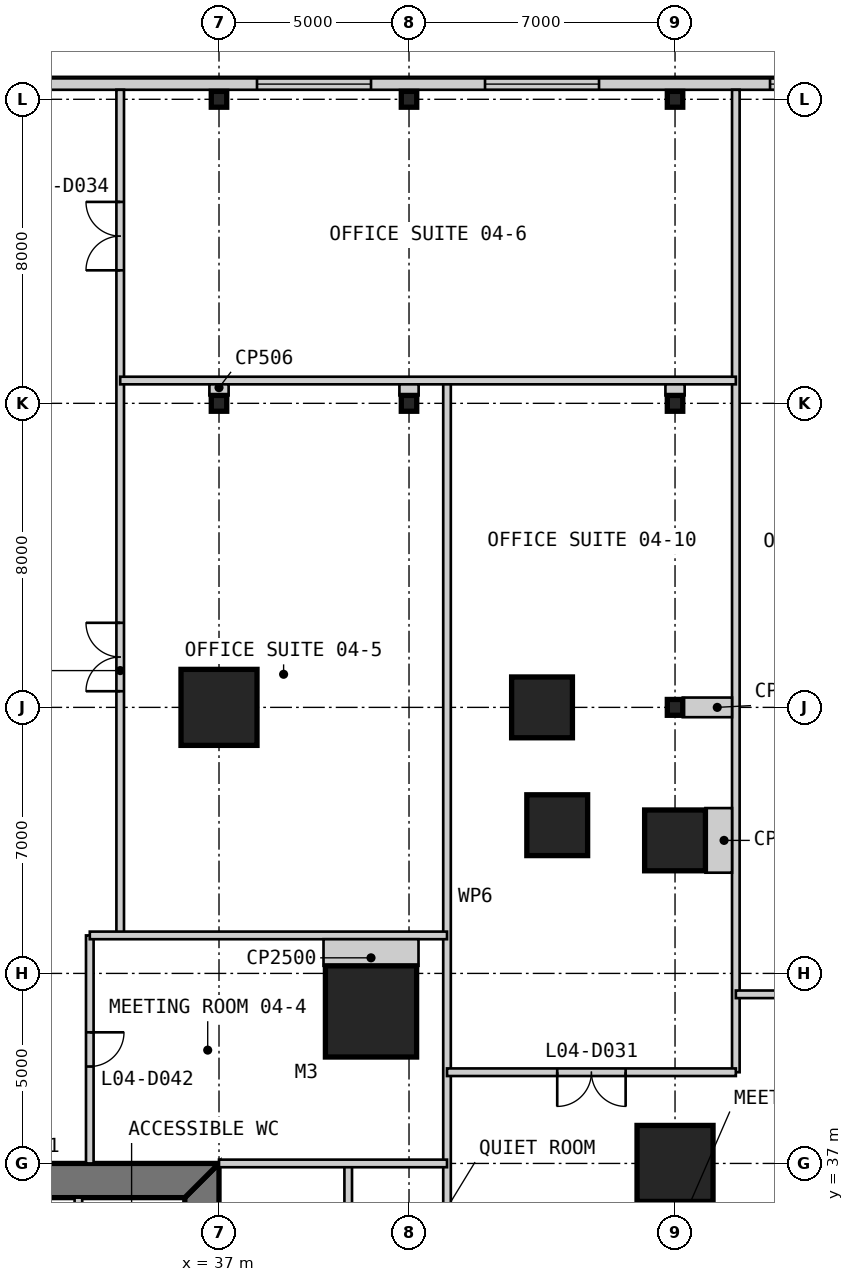
"""IFC4 building model, lengths in metres.
Left out: names, types, materials, properties, quantities, classifications, styles, units other than length and angle.
Written with IfcOpenShell. Run it as: python <this file> out.ifc"""

import sys

from ifc_helpers import new_model, si_unit, direction, frame, frame_2d, origin, origin_2d, place, context, subcontext, project, spatial, polyline, rectangle, i_section, outline, extrude, element, fill, save


model = new_model("IFC4")
c1 = context("Model", 3, precision=1e-05, world=origin(), true_north=direction((0.0, 1.0)))
c2 = subcontext(c1, "Body", "Model", "MODEL_VIEW")
j1 = project(units=[si_unit("LENGTHUNIT", "METRE"), si_unit("PLANEANGLEUNIT", "RADIAN")], contexts=[c1])
p1 = place(None, origin())
s1 = spatial("IfcSite", under=j1, at=p1, CompositionType="ELEMENT")
p2 = place(p1, origin())
s2 = spatial("IfcBuilding", under=s1, at=p2, CompositionType="ELEMENT")
p3 = place(p2, frame((0.0, 0.0, 21.4)))
s3 = spatial("IfcBuildingStorey", under=s2, at=p3, CompositionType="ELEMENT", Elevation=21.4)
p4 = place(p3, frame((41.0, 41.0, 0.0), z_axis=(0.0, 0.0, 1.0), x_axis=(1.0, 0.0, 0.0)))
e1 = element("IfcColumn", 1, at=p4, inside=s3, PredefinedType="COLUMN", context=c2, shape_type="SweptSolid", body=[
    extrude(rectangle(XDim=2.4, YDim=2.4, at=origin_2d()), origin(), (0.0, 0.0, 1.0), 4.8),
])
p5 = place(p3, frame((49.0, 37.0, 0.0), z_axis=(0.0, 0.0, 1.0), x_axis=(1.0, 0.0, 0.0)))
e2 = element("IfcColumn", 2, at=p5, inside=s3, PredefinedType="COLUMN", context=c2, shape_type="SweptSolid", body=[
    extrude(rectangle(XDim=2.0, YDim=2.0, at=origin_2d()), origin(), (0.0, 0.0, 1.0), 4.8),
])
for number, where, z_axis, x_axis in (
    (3, (49.0, 45.5, 0.0), (0.0, 0.0, 1.0), (1.0, 0.0, 0.0)),
    (4, (45.9, 45.9, 0.0), (0.0, 0.0, 1.0), (1.0, 0.0, 0.0)),
    (5, (45.5, 49.0, 0.0), (0.0, 0.0, 1.0), (1.0, 0.0, 0.0)),
):
    element("IfcColumn", number, at=place(p3, frame(where, z_axis=z_axis, x_axis=x_axis)), inside=s3, PredefinedType="COLUMN", context=c2, shape_type="SweptSolid", body=[
        extrude(rectangle(XDim=1.6, YDim=1.6, at=origin_2d()), origin(), (0.0, 0.0, 1.0), 4.8),
    ])
p6 = place(p3, frame((37.0, 49.0, 0.0), z_axis=(0.0, 0.0, 1.0), x_axis=(1.0, 0.0, 0.0)))
e6 = element("IfcColumn", 6, at=p6, inside=s3, PredefinedType="COLUMN", context=c2, shape_type="SweptSolid", body=[
    extrude(rectangle(XDim=2.0, YDim=2.0, at=origin_2d()), origin(), (0.0, 0.0, 1.0), 4.8),
])
for number, where, z_axis, x_axis in (
    (7, (37.0, 57.0, 0.0), (0.0, 0.0, 1.0), (1.0, 0.0, 0.0)),
    (8, (37.0, 65.0, 0.0), (0.0, 0.0, 1.0), (1.0, 0.0, 0.0)),
    (9, (42.0, 57.0, 0.0), (0.0, 0.0, 1.0), (1.0, 0.0, 0.0)),
    (10, (42.0, 65.0, 0.0), (0.0, 0.0, 1.0), (1.0, 0.0, 0.0)),
    (11, (49.0, 49.0, 0.0), (0.0, 0.0, 1.0), (1.0, 0.0, 0.0)),
    (12, (49.0, 57.0, 0.0), (0.0, 0.0, 1.0), (1.0, 0.0, 0.0)),
    (13, (49.0, 65.0, 0.0), (0.0, 0.0, 1.0), (1.0, 0.0, 0.0)),
):
    element("IfcColumn", number, at=place(p3, frame(where, z_axis=z_axis, x_axis=x_axis)), inside=s3, PredefinedType="COLUMN", context=c2, shape_type="SweptSolid", body=[
        extrude(i_section(OverallWidth=0.406, OverallDepth=0.417, WebThickness=0.03, FlangeThickness=0.048, at=origin_2d()), origin(), (0.0, 0.0, 1.0), 4.8),
    ])
p7 = place(p3, frame((36.55, 13.9, 0.0), z_axis=(0.0, 0.0, 1.0), x_axis=(0.0, 1.0, 0.0)))
e14 = element("IfcWall", 14, at=p7, inside=s3, PredefinedType="SHEAR", context=c2, shape_type="SweptSolid", body=[
    extrude(outline(polyline([(-0.9, -0.45), (23.1, -0.45), (22.2, 0.45), (0.0, 0.45), (-0.9, -0.45)])), origin(), (0.0, 0.0, 1.0), 4.8),
])
p8 = place(p7, frame((20.2, 0.0, 0.0)))
e15 = element("IfcOpeningElement", 15, at=p8, cuts=e14, PredefinedType="OPENING", context=c2, shape_type="SweptSolid", body=[
    extrude(rectangle(XDim=1.0, YDim=2.2, at=frame_2d((0.5, 1.1))), frame((0.0, 0.46, 0.0), z_axis=(0.0, -1.0, 0.0), x_axis=(1.0, 0.0, 0.0)), (0.0, 0.0, 1.0), 0.92),
])
p9 = place(p7, frame((17.25, 0.0, 0.0)))
e16 = element("IfcOpeningElement", 16, at=p9, cuts=e14, PredefinedType="OPENING", context=c2, shape_type="SweptSolid", body=[
    extrude(rectangle(XDim=0.9, YDim=2.2, at=frame_2d((0.45, 1.1))), frame((0.0, 0.46, 0.0), z_axis=(0.0, -1.0, 0.0), x_axis=(1.0, 0.0, 0.0)), (0.0, 0.0, 1.0), 0.92),
])
p10 = place(p3, frame((37.0, 36.55, 0.0), z_axis=(0.0, 0.0, 1.0), x_axis=(-1.0, 0.0, 0.0)))
e17 = element("IfcWall", 17, at=p10, inside=s3, PredefinedType="SHEAR", context=c2, shape_type="SweptSolid", body=[
    extrude(outline(polyline([(0.0, -0.45), (24.0, -0.45), (23.1, 0.45), (0.9, 0.45), (0.0, -0.45)])), origin(), (0.0, 0.0, 1.0), 4.8),
])
p11 = place(p10, frame((4.9, 0.0, 0.0)))
e18 = element("IfcOpeningElement", 18, at=p11, cuts=e17, PredefinedType="OPENING", context=c2, shape_type="SweptSolid", body=[
    extrude(rectangle(XDim=1.0, YDim=2.2, at=frame_2d((0.5, 1.1))), frame((0.0, 0.46, 0.0), z_axis=(0.0, -1.0, 0.0), x_axis=(1.0, 0.0, 0.0)), (0.0, 0.0, 1.0), 0.92),
])
p12 = place(p10, frame((8.9, 0.0, 0.0)))
e19 = element("IfcOpeningElement", 19, at=p12, cuts=e17, PredefinedType="OPENING", context=c2, shape_type="SweptSolid", body=[
    extrude(rectangle(XDim=1.1, YDim=2.2, at=frame_2d((0.55, 1.1))), frame((0.0, 0.46, 0.0), z_axis=(0.0, -1.0, 0.0), x_axis=(1.0, 0.0, 0.0)), (0.0, 0.0, 1.0), 0.92),
])
p13 = place(p10, frame((15.05, 0.0, 0.0)))
e20 = element("IfcOpeningElement", 20, at=p13, cuts=e17, PredefinedType="OPENING", context=c2, shape_type="SweptSolid", body=[
    extrude(rectangle(XDim=0.9, YDim=2.2, at=frame_2d((0.45, 1.1))), frame((0.0, 0.46, 0.0), z_axis=(0.0, -1.0, 0.0), x_axis=(1.0, 0.0, 0.0)), (0.0, 0.0, 1.0), 0.92),
])
p14 = place(p10, frame((17.9, 0.0, 0.0)))
e21 = element("IfcOpeningElement", 21, at=p14, cuts=e17, PredefinedType="OPENING", context=c2, shape_type="SweptSolid", body=[
    extrude(rectangle(XDim=1.0, YDim=2.2, at=frame_2d((0.5, 1.1))), frame((0.0, 0.46, 0.0), z_axis=(0.0, -1.0, 0.0), x_axis=(1.0, 0.0, 0.0)), (0.0, 0.0, 1.0), 0.92),
])
p15 = place(p10, frame((21.4, 0.0, 0.0)))
e22 = element("IfcOpeningElement", 22, at=p15, cuts=e17, PredefinedType="OPENING", context=c2, shape_type="SweptSolid", body=[
    extrude(rectangle(XDim=1.0, YDim=2.2, at=frame_2d((0.5, 1.1))), frame((0.0, 0.46, 0.0), z_axis=(0.0, -1.0, 0.0), x_axis=(1.0, 0.0, 0.0)), (0.0, 0.0, 1.0), 0.92),
])
p16 = place(p3, frame((57.55, 65.4, 0.0), z_axis=(0.0, 0.0, 1.0), x_axis=(-1.0, 0.0, 0.0)))
e23 = element("IfcWall", 23, at=p16, inside=s3, PredefinedType="SOLIDWALL", context=c2, shape_type="SweptSolid", body=[
    extrude(rectangle(XDim=65.1, YDim=0.3, at=frame_2d((32.55, 0.0))), origin(), (0.0, 0.0, 1.0), 4.5),
])
p17 = place(p16, frame((59.05, 0.0, 0.9)))
e24 = element("IfcOpeningElement", 24, at=p17, cuts=e23, PredefinedType="OPENING", context=c2, shape_type="SweptSolid", body=[
    extrude(rectangle(XDim=3.0, YDim=2.4, at=frame_2d((1.5, 1.2))), frame((0.0, 0.16, 0.0), z_axis=(0.0, -1.0, 0.0), x_axis=(1.0, 0.0, 0.0)), (0.0, 0.0, 1.0), 0.32),
])
p18 = place(p16, frame((51.05, 0.0, 0.9)))
e25 = element("IfcOpeningElement", 25, at=p18, cuts=e23, PredefinedType="OPENING", context=c2, shape_type="SweptSolid", body=[
    extrude(rectangle(XDim=3.0, YDim=2.4, at=frame_2d((1.5, 1.2))), frame((0.0, 0.16, 0.0), z_axis=(0.0, -1.0, 0.0), x_axis=(1.0, 0.0, 0.0)), (0.0, 0.0, 1.0), 0.32),
])
p19 = place(p16, frame((37.05, 0.0, 0.9)))
e26 = element("IfcOpeningElement", 26, at=p19, cuts=e23, PredefinedType="OPENING", context=c2, shape_type="SweptSolid", body=[
    extrude(rectangle(XDim=3.0, YDim=2.4, at=frame_2d((1.5, 1.2))), frame((0.0, 0.16, 0.0), z_axis=(0.0, -1.0, 0.0), x_axis=(1.0, 0.0, 0.0)), (0.0, 0.0, 1.0), 0.32),
])
p20 = place(p16, frame((25.05, 0.0, 0.9)))
e27 = element("IfcOpeningElement", 27, at=p20, cuts=e23, PredefinedType="OPENING", context=c2, shape_type="SweptSolid", body=[
    extrude(rectangle(XDim=3.0, YDim=2.4, at=frame_2d((1.5, 1.2))), frame((0.0, 0.16, 0.0), z_axis=(0.0, -1.0, 0.0), x_axis=(1.0, 0.0, 0.0)), (0.0, 0.0, 1.0), 0.32),
])
p21 = place(p16, frame((16.55, 0.0, 0.9)))
e28 = element("IfcOpeningElement", 28, at=p21, cuts=e23, PredefinedType="OPENING", context=c2, shape_type="SweptSolid", body=[
    extrude(rectangle(XDim=3.0, YDim=2.4, at=frame_2d((1.5, 1.2))), frame((0.0, 0.16, 0.0), z_axis=(0.0, -1.0, 0.0), x_axis=(1.0, 0.0, 0.0)), (0.0, 0.0, 1.0), 0.32),
])
p22 = place(p16, frame((10.55, 0.0, 0.9)))
e29 = element("IfcOpeningElement", 29, at=p22, cuts=e23, PredefinedType="OPENING", context=c2, shape_type="SweptSolid", body=[
    extrude(rectangle(XDim=3.0, YDim=2.4, at=frame_2d((1.5, 1.2))), frame((0.0, 0.16, 0.0), z_axis=(0.0, -1.0, 0.0), x_axis=(1.0, 0.0, 0.0)), (0.0, 0.0, 1.0), 0.32),
])
p23 = place(p16, frame((3.05, 0.0, 0.9)))
e30 = element("IfcOpeningElement", 30, at=p23, cuts=e23, PredefinedType="OPENING", context=c2, shape_type="SweptSolid", body=[
    extrude(rectangle(XDim=3.0, YDim=2.4, at=frame_2d((1.5, 1.2))), frame((0.0, 0.16, 0.0), z_axis=(0.0, -1.0, 0.0), x_axis=(1.0, 0.0, 0.0)), (0.0, 0.0, 1.0), 0.32),
])
p24 = place(p3, frame((33.3, 36.1, 0.0), z_axis=(0.0, 0.0, 1.0), x_axis=(0.0, -1.0, 0.0)))
e31 = element("IfcWall", 31, at=p24, inside=s3, PredefinedType="PARTITIONING", context=c2, shape_type="SweptSolid", body=[
    extrude(rectangle(XDim=16.1, YDim=0.2, at=frame_2d((8.05, 0.0))), origin(), (0.0, 0.0, 1.0), 4.6),
])
p25 = place(p3, frame((33.6, 37.0, 0.0), z_axis=(0.0, 0.0, 1.0), x_axis=(0.0, 1.0, 0.0)))
e32 = element("IfcWall", 32, at=p25, inside=s3, PredefinedType="PARTITIONING", context=c2, shape_type="SweptSolid", body=[
    extrude(rectangle(XDim=6.0, YDim=0.2, at=frame_2d((3.0, 0.0))), origin(), (0.0, 0.0, 1.0), 4.5),
])
p26 = place(p25, frame((2.55, 0.0, 0.0)))
e33 = element("IfcOpeningElement", 33, at=p26, cuts=e32, PredefinedType="OPENING", context=c2, shape_type="SweptSolid", body=[
    extrude(rectangle(XDim=0.9, YDim=2.2, at=frame_2d((0.45, 1.1))), frame((0.0, 0.11, 0.0), z_axis=(0.0, -1.0, 0.0), x_axis=(1.0, 0.0, 0.0)), (0.0, 0.0, 1.0), 0.22),
])
p27 = place(p3, frame((34.4, 43.0, 0.0), z_axis=(0.0, 0.0, 1.0), x_axis=(0.0, 1.0, 0.0)))
e34 = element("IfcWall", 34, at=p27, inside=s3, PredefinedType="PARTITIONING", context=c2, shape_type="SweptSolid", body=[
    extrude(rectangle(XDim=22.25, YDim=0.2, at=frame_2d((11.125, 0.0))), origin(), (0.0, 0.0, 1.0), 4.5),
])
p28 = place(p27, frame((6.425, 0.0, 0.0)))
e35 = element("IfcOpeningElement", 35, at=p28, cuts=e34, PredefinedType="OPENING", context=c2, shape_type="SweptSolid", body=[
    extrude(rectangle(XDim=1.8, YDim=2.4, at=frame_2d((0.9, 1.2))), frame((0.0, 0.11, 0.0), z_axis=(0.0, -1.0, 0.0), x_axis=(1.0, 0.0, 0.0)), (0.0, 0.0, 1.0), 0.22),
])
p29 = place(p27, frame((17.5, 0.0, 0.0)))
e36 = element("IfcOpeningElement", 36, at=p29, cuts=e34, PredefinedType="OPENING", context=c2, shape_type="SweptSolid", body=[
    extrude(rectangle(XDim=1.8, YDim=2.4, at=frame_2d((0.9, 1.2))), frame((0.0, 0.11, 0.0), z_axis=(0.0, -1.0, 0.0), x_axis=(1.0, 0.0, 0.0)), (0.0, 0.0, 1.0), 0.22),
])
p30 = place(p3, frame((40.4, 30.4, 0.0), z_axis=(0.0, 0.0, 1.0), x_axis=(0.0, 1.0, 0.0)))
e37 = element("IfcWall", 37, at=p30, inside=s3, PredefinedType="PARTITIONING", context=c2, shape_type="SweptSolid", body=[
    extrude(rectangle(XDim=6.6, YDim=0.2, at=frame_2d((3.3, 0.0))), origin(), (0.0, 0.0, 1.0), 4.5),
])
p31 = place(p30, frame((2.85, 0.0, 0.0)))
e38 = element("IfcOpeningElement", 38, at=p31, cuts=e37, PredefinedType="OPENING", context=c2, shape_type="SweptSolid", body=[
    extrude(rectangle(XDim=0.9, YDim=2.2, at=frame_2d((0.45, 1.1))), frame((0.0, 0.11, 0.0), z_axis=(0.0, -1.0, 0.0), x_axis=(1.0, 0.0, 0.0)), (0.0, 0.0, 1.0), 0.22),
])
p32 = place(p3, frame((43.0, 30.4, 0.0), z_axis=(0.0, 0.0, 1.0), x_axis=(0.0, 1.0, 0.0)))
e39 = element("IfcWall", 39, at=p32, inside=s3, PredefinedType="PARTITIONING", context=c2, shape_type="SweptSolid", body=[
    extrude(rectangle(XDim=27.2, YDim=0.2, at=frame_2d((13.6, 0.0))), origin(), (0.0, 0.0, 1.0), 3.843),
])
p33 = place(p3, frame((50.6, 39.4, 0.0), z_axis=(0.0, 0.0, 1.0), x_axis=(0.0, 1.0, 0.0)))
e40 = element("IfcWall", 40, at=p33, inside=s3, PredefinedType="PARTITIONING", context=c2, shape_type="SweptSolid", body=[
    extrude(rectangle(XDim=25.85, YDim=0.2, at=frame_2d((12.925, 0.0))), origin(), (0.0, 0.0, 1.0), 4.5),
])
p34 = place(p3, frame((37.0, 37.0, 0.0), z_axis=(0.0, 0.0, 1.0), x_axis=(1.0, 0.0, 0.0)))
e41 = element("IfcWall", 41, at=p34, inside=s3, PredefinedType="PARTITIONING", context=c2, shape_type="SweptSolid", body=[
    extrude(rectangle(XDim=6.0, YDim=0.2, at=frame_2d((3.0, 0.0))), origin(), (0.0, 0.0, 1.0), 3.653),
])
p35 = place(p3, frame((43.0, 39.4, 0.0), z_axis=(0.0, 0.0, 1.0), x_axis=(1.0, 0.0, 0.0)))
e42 = element("IfcWall", 42, at=p35, inside=s3, PredefinedType="PARTITIONING", context=c2, shape_type="SweptSolid", body=[
    extrude(rectangle(XDim=7.6, YDim=0.2, at=frame_2d((3.8, 0.0))), origin(), (0.0, 0.0, 1.0), 4.5),
])
p36 = place(p35, frame((2.9, 0.0, 0.0)))
e43 = element("IfcOpeningElement", 43, at=p36, cuts=e42, PredefinedType="OPENING", context=c2, shape_type="SweptSolid", body=[
    extrude(rectangle(XDim=1.8, YDim=2.4, at=frame_2d((0.9, 1.2))), frame((0.0, 0.11, 0.0), z_axis=(0.0, -1.0, 0.0), x_axis=(1.0, 0.0, 0.0)), (0.0, 0.0, 1.0), 0.22),
])
p37 = place(p3, frame((50.6, 41.45, 0.0), z_axis=(0.0, 0.0, 1.0), x_axis=(1.0, 0.0, 0.0)))
e44 = element("IfcWall", 44, at=p37, inside=s3, PredefinedType="PARTITIONING", context=c2, shape_type="SweptSolid", body=[
    extrude(rectangle(XDim=6.65, YDim=0.2, at=frame_2d((3.325, 0.0))), origin(), (0.0, 0.0, 1.0), 4.5),
])
p38 = place(p37, frame((2.425, 0.0, 0.0)))
e45 = element("IfcOpeningElement", 45, at=p38, cuts=e44, PredefinedType="OPENING", context=c2, shape_type="SweptSolid", body=[
    extrude(rectangle(XDim=1.8, YDim=2.4, at=frame_2d((0.9, 1.2))), frame((0.0, 0.11, 0.0), z_axis=(0.0, -1.0, 0.0), x_axis=(1.0, 0.0, 0.0)), (0.0, 0.0, 1.0), 0.22),
])
p39 = place(p3, frame((33.6, 43.0, 0.0), z_axis=(0.0, 0.0, 1.0), x_axis=(1.0, 0.0, 0.0)))
e46 = element("IfcWall", 46, at=p39, inside=s3, PredefinedType="PARTITIONING", context=c2, shape_type="SweptSolid", body=[
    extrude(rectangle(XDim=9.4, YDim=0.2, at=frame_2d((4.7, 0.0))), origin(), (0.0, 0.0, 1.0), 4.5),
])
p40 = place(p3, frame((34.4, 57.6, 0.0), z_axis=(0.0, 0.0, 1.0), x_axis=(1.0, 0.0, 0.0)))
e47 = element("IfcWall", 47, at=p40, inside=s3, PredefinedType="PARTITIONING", context=c2, shape_type="SweptSolid", body=[
    extrude(rectangle(XDim=16.2, YDim=0.2, at=frame_2d((8.1, 0.0))), origin(), (0.0, 0.0, 1.0), 4.5),
])
p41 = place(p3, frame((50.5, 45.5, 0.0), z_axis=(0.0, 0.0, 1.0), x_axis=(-1.0, 0.0, 0.0)))
e48 = element("IfcWall", 48, at=p41, inside=s3, PredefinedType="PARTITIONING", context=c2, shape_type="SweptSolid", body=[
    extrude(rectangle(XDim=0.7, YDim=1.7, at=frame_2d((0.35, 0.0))), origin(), (0.0, 0.0, 1.0), 4.5),
])
p42 = place(p3, frame((50.5, 49.0, 0.0), z_axis=(0.0, 0.0, 1.0), x_axis=(-1.0, 0.0, 0.0)))
e49 = element("IfcWall", 49, at=p42, inside=s3, PredefinedType="PARTITIONING", context=c2, shape_type="SweptSolid", body=[
    extrude(rectangle(XDim=1.297, YDim=0.517, at=frame_2d((0.648, 0.0))), origin(), (0.0, 0.0, 1.0), 3.754),
])
for number, where, z_axis, x_axis in (
    (50, (49.0, 57.5, 0.0), (0.0, 0.0, 1.0), (0.0, -1.0, 0.0)),
    (51, (37.0, 57.5, 0.0), (0.0, 0.0, 1.0), (0.0, -1.0, 0.0)),
    (52, (42.0, 57.5, 0.0), (0.0, 0.0, 1.0), (0.0, -1.0, 0.0)),
):
    element("IfcWall", number, at=place(p3, frame(where, z_axis=z_axis, x_axis=x_axis)), inside=s3, PredefinedType="PARTITIONING", context=c2, shape_type="SweptSolid", body=[
        extrude(rectangle(XDim=0.292, YDim=0.506, at=frame_2d((0.146, 0.0))), origin(), (0.0, 0.0, 1.0), 4.5),
    ])
p43 = place(p3, frame((41.0, 42.9, 0.0), z_axis=(0.0, 0.0, 1.0), x_axis=(0.0, -1.0, 0.0)))
e53 = element("IfcWall", 53, at=p43, inside=s3, PredefinedType="PARTITIONING", context=c2, shape_type="SweptSolid", body=[
    extrude(rectangle(XDim=0.7, YDim=2.5, at=frame_2d((0.35, 0.0))), origin(), (0.0, 0.0, 1.0), 4.5),
])
p44 = place(p21, origin())
e54 = element("IfcWindow", 54, at=p44, inside=s3, PartitioningType="SINGLE_PANEL", PredefinedType="WINDOW", context=c2, shape_type="SweptSolid", body=[
    extrude(rectangle(XDim=3.0, YDim=2.4, at=frame_2d((1.5, 1.2))), frame((0.0, 0.03, 0.0), z_axis=(0.0, -1.0, 0.0), x_axis=(1.0, 0.0, 0.0)), (0.0, 0.0, 1.0), 0.06),
])
fill(e28, e54)
p45 = place(p22, origin())
e55 = element("IfcWindow", 55, at=p45, inside=s3, PartitioningType="SINGLE_PANEL", PredefinedType="WINDOW", context=c2, shape_type="SweptSolid", body=[
    extrude(rectangle(XDim=3.0, YDim=2.4, at=frame_2d((1.5, 1.2))), frame((0.0, 0.03, 0.0), z_axis=(0.0, -1.0, 0.0), x_axis=(1.0, 0.0, 0.0)), (0.0, 0.0, 1.0), 0.06),
])
fill(e29, e55)
p46 = place(p23, origin())
e56 = element("IfcWindow", 56, at=p46, inside=s3, PartitioningType="SINGLE_PANEL", PredefinedType="WINDOW", context=c2, shape_type="SweptSolid", body=[
    extrude(rectangle(XDim=3.0, YDim=2.4, at=frame_2d((1.5, 1.2))), frame((0.0, 0.03, 0.0), z_axis=(0.0, -1.0, 0.0), x_axis=(1.0, 0.0, 0.0)), (0.0, 0.0, 1.0), 0.06),
])
fill(e30, e56)
p47 = place(p36, frame((1.8, 0.0, 0.0), z_axis=(0.0, 0.0, 1.0), x_axis=(-1.0, 0.0, 0.0)))
e57 = element("IfcDoor", 57, at=p47, inside=s3, OperationType="DOUBLE_DOOR_SINGLE_SWING", PredefinedType="DOOR", context=c2, shape_type="SweptSolid", body=[
    extrude(rectangle(XDim=1.8, YDim=2.4, at=frame_2d((0.9, 1.2))), frame((0.0, 0.025, 0.0), z_axis=(0.0, -1.0, 0.0), x_axis=(1.0, 0.0, 0.0)), (0.0, 0.0, 1.0), 0.05),
])
fill(e43, e57)
p48 = place(p28, origin())
e58 = element("IfcDoor", 58, at=p48, inside=s3, OperationType="DOUBLE_DOOR_SINGLE_SWING", PredefinedType="DOOR", context=c2, shape_type="SweptSolid", body=[
    extrude(rectangle(XDim=1.8, YDim=2.4, at=frame_2d((0.9, 1.2))), frame((0.0, 0.025, 0.0), z_axis=(0.0, -1.0, 0.0), x_axis=(1.0, 0.0, 0.0)), (0.0, 0.0, 1.0), 0.05),
])
fill(e35, e58)
p49 = place(p29, origin())
e59 = element("IfcDoor", 59, at=p49, inside=s3, OperationType="DOUBLE_DOOR_SINGLE_SWING", PredefinedType="DOOR", context=c2, shape_type="SweptSolid", body=[
    extrude(rectangle(XDim=1.8, YDim=2.4, at=frame_2d((0.9, 1.2))), frame((0.0, 0.025, 0.0), z_axis=(0.0, -1.0, 0.0), x_axis=(1.0, 0.0, 0.0)), (0.0, 0.0, 1.0), 0.05),
])
fill(e36, e59)
p50 = place(p26, frame((0.9, 0.0, 0.0), z_axis=(0.0, 0.0, 1.0), x_axis=(-1.0, 0.0, 0.0)))
e60 = element("IfcDoor", 60, at=p50, inside=s3, OperationType="SINGLE_SWING_LEFT", PredefinedType="DOOR", context=c2, shape_type="SweptSolid", body=[
    extrude(rectangle(XDim=0.9, YDim=2.2, at=frame_2d((0.45, 1.1))), frame((0.0, 0.025, 0.0), z_axis=(0.0, -1.0, 0.0), x_axis=(1.0, 0.0, 0.0)), (0.0, 0.0, 1.0), 0.05),
])
fill(e33, e60)
save(model, sys.argv[1])
